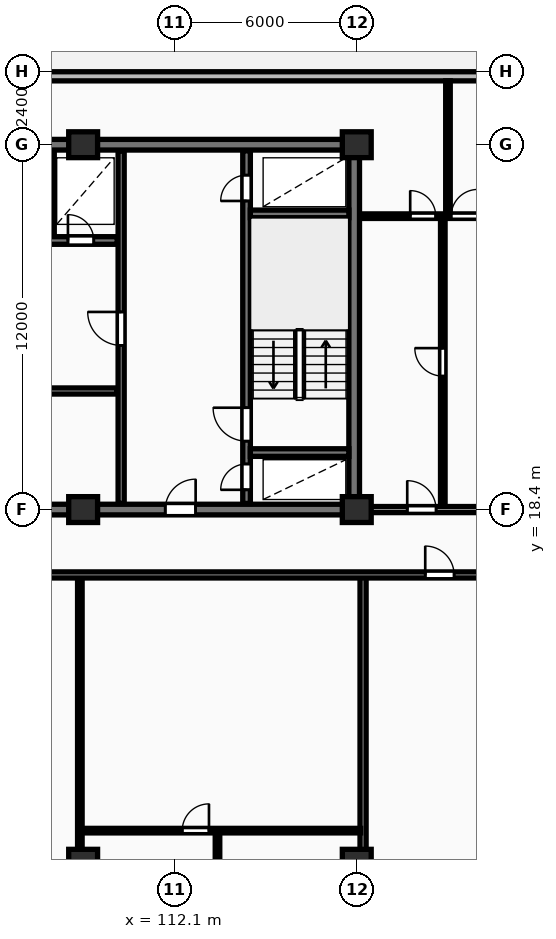
"""IFC4 building model, lengths in metres.
Left out: names, types, materials, properties, quantities, classifications, styles, units other than length and angle.
Written with IfcOpenShell. Run it as: python <this file> out.ifc"""

import sys

from ifc_helpers import new_model, si_unit, direction, frame, frame_2d, origin, origin_2d, place, context, subcontext, project, spatial, rectangle, extrude, element, fill, save


model = new_model("IFC4")
c1 = context("Model", 3, precision=1e-05, world=origin(), true_north=direction((0.0, 1.0)))
c2 = subcontext(c1, "Body", "Model", "MODEL_VIEW")
j1 = project(units=[si_unit("LENGTHUNIT", "METRE"), si_unit("PLANEANGLEUNIT", "RADIAN")], contexts=[c1])
p1 = place(None, origin())
s1 = spatial("IfcSite", under=j1, at=p1, CompositionType="ELEMENT")
p2 = place(p1, origin())
s2 = spatial("IfcBuilding", under=s1, at=p2, CompositionType="ELEMENT")
p3 = place(p2, frame((0.0, 0.0, 24.0)))
s3 = spatial("IfcBuildingStorey", under=s2, at=p3, CompositionType="ELEMENT", Elevation=24.0)
for number, where, z_axis, x_axis in (
    (1, (109.1, 6.8, 0.0), (0.0, 0.0, 1.0), (1.0, 0.0, 0.0)),
    (2, (109.1, 18.4, 0.0), (0.0, 0.0, 1.0), (1.0, 0.0, 0.0)),
    (3, (109.1, 30.4, 0.0), (0.0, 0.0, 1.0), (1.0, 0.0, 0.0)),
    (4, (118.1, 6.8, 0.0), (0.0, 0.0, 1.0), (1.0, 0.0, 0.0)),
    (5, (118.1, 18.4, 0.0), (0.0, 0.0, 1.0), (1.0, 0.0, 0.0)),
    (6, (118.1, 30.4, 0.0), (0.0, 0.0, 1.0), (1.0, 0.0, 0.0)),
):
    element("IfcColumn", number, at=place(p3, frame(where, z_axis=z_axis, x_axis=x_axis)), inside=s3, PredefinedType="COLUMN", context=c2, shape_type="SweptSolid", body=[
        extrude(rectangle(XDim=0.95, YDim=0.85, at=origin_2d()), origin(), (0.0, 0.0, 1.0), 3.25),
    ])
p4 = place(p3, frame((132.7, 32.65, 0.0), z_axis=(0.0, 0.0, 1.0), x_axis=(-1.0, 0.0, 0.0)))
e7 = element("IfcWall", 7, at=p4, inside=s3, PredefinedType="STANDARD", context=c2, shape_type="SweptSolid", body=[
    extrude(rectangle(XDim=62.0, YDim=0.3, at=frame_2d((31.0, 0.0))), origin(), (0.0, 0.0, 1.0), 2.97),
])
p5 = place(p4, frame((52.125, 0.0, 0.85)))
e8 = element("IfcOpeningElement", 8, at=p5, cuts=e7, PredefinedType="OPENING", context=c2, shape_type="SweptSolid", body=[
    extrude(rectangle(XDim=1.8, YDim=1.8, at=frame_2d((0.9, 0.9))), frame((0.0, 0.16, 0.0), z_axis=(0.0, -1.0, 0.0), x_axis=(1.0, 0.0, 0.0)), (0.0, 0.0, 1.0), 0.32),
])
p6 = place(p4, frame((8.775, 0.0, 0.85)))
e9 = element("IfcOpeningElement", 9, at=p6, cuts=e7, PredefinedType="OPENING", context=c2, shape_type="SweptSolid", body=[
    extrude(rectangle(XDim=1.8, YDim=1.8, at=frame_2d((0.9, 0.9))), frame((0.0, 0.16, 0.0), z_axis=(0.0, -1.0, 0.0), x_axis=(1.0, 0.0, 0.0)), (0.0, 0.0, 1.0), 0.32),
])
p7 = place(p3, frame((81.925, 30.4, 0.0), z_axis=(0.0, 0.0, 1.0), x_axis=(1.0, 0.0, 0.0)))
e10 = element("IfcWall", 10, at=p7, inside=s3, PredefinedType="SHEAR", context=c2, shape_type="SweptSolid", body=[
    extrude(rectangle(XDim=36.265, YDim=0.35, at=frame_2d((18.132, 0.0))), origin(), (0.0, 0.0, 1.0), 3.25),
])
p8 = place(p3, frame((118.015, 18.575, 0.0), z_axis=(0.0, 0.0, 1.0), x_axis=(0.0, 1.0, 0.0)))
e11 = element("IfcWall", 11, at=p8, inside=s3, PredefinedType="SHEAR", context=c2, shape_type="SweptSolid", body=[
    extrude(rectangle(XDim=11.65, YDim=0.35, at=frame_2d((5.825, 0.0))), origin(), (0.0, 0.0, 1.0), 3.25),
])
p9 = place(p3, frame((81.925, 18.4, 0.0), z_axis=(0.0, 0.0, 1.0), x_axis=(1.0, 0.0, 0.0)))
e12 = element("IfcWall", 12, at=p9, inside=s3, PredefinedType="SHEAR", context=c2, shape_type="SweptSolid", body=[
    extrude(rectangle(XDim=36.265, YDim=0.35, at=frame_2d((18.132, 0.0))), origin(), (0.0, 0.0, 1.0), 3.25),
])
p10 = place(p9, frame((5.675, 0.0, 0.0)))
e13 = element("IfcOpeningElement", 13, at=p10, cuts=e12, PredefinedType="OPENING", context=c2, shape_type="SweptSolid", body=[
    extrude(rectangle(XDim=1.0, YDim=2.15, at=frame_2d((0.5, 1.075))), frame((0.0, 0.185, 0.0), z_axis=(0.0, -1.0, 0.0), x_axis=(1.0, 0.0, 0.0)), (0.0, 0.0, 1.0), 0.37),
])
p11 = place(p9, frame((21.925, 0.0, 0.0)))
e14 = element("IfcOpeningElement", 14, at=p11, cuts=e12, PredefinedType="OPENING", context=c2, shape_type="SweptSolid", body=[
    extrude(rectangle(XDim=1.5, YDim=2.2, at=frame_2d((0.75, 1.1))), frame((0.0, 0.185, 0.0), z_axis=(0.0, -1.0, 0.0), x_axis=(1.0, 0.0, 0.0)), (0.0, 0.0, 1.0), 0.37),
])
p12 = place(p9, frame((29.875, 0.0, 0.0)))
e15 = element("IfcOpeningElement", 15, at=p12, cuts=e12, PredefinedType="OPENING", context=c2, shape_type="SweptSolid", body=[
    extrude(rectangle(XDim=1.0, YDim=2.15, at=frame_2d((0.5, 1.075))), frame((0.0, 0.185, 0.0), z_axis=(0.0, -1.0, 0.0), x_axis=(1.0, 0.0, 0.0)), (0.0, 0.0, 1.0), 0.37),
])
p13 = place(p3, frame((108.05, 27.38, 0.0), z_axis=(0.0, 0.0, 1.0), x_axis=(0.0, 1.0, 0.0)))
e16 = element("IfcWall", 16, at=p13, inside=s3, PredefinedType="PARTITIONING", context=c2, shape_type="SweptSolid", body=[
    extrude(rectangle(XDim=2.82, YDim=0.2, at=frame_2d((1.41, 0.0))), origin(), (0.0, 0.0, 1.0), 2.97),
])
p14 = place(p3, frame((99.68, 27.25, 0.0), z_axis=(0.0, 0.0, 1.0), x_axis=(1.0, 0.0, 0.0)))
e17 = element("IfcWall", 17, at=p14, inside=s3, PredefinedType="SHEAR", context=c2, shape_type="SweptSolid", body=[
    extrude(rectangle(XDim=10.54, YDim=0.25, at=frame_2d((5.27, 0.0))), origin(), (0.0, 0.0, 1.0), 3.25),
])
p15 = place(p14, frame((8.92, 0.0, 0.0)))
e18 = element("IfcOpeningElement", 18, at=p15, cuts=e17, PredefinedType="OPENING", context=c2, shape_type="SweptSolid", body=[
    extrude(rectangle(XDim=0.85, YDim=2.05, at=frame_2d((0.425, 1.025))), frame((0.0, 0.135, 0.0), z_axis=(0.0, -1.0, 0.0), x_axis=(1.0, 0.0, 0.0)), (0.0, 0.0, 1.0), 0.27),
])
p16 = place(p3, frame((91.08, 22.3, 0.0), z_axis=(0.0, 0.0, 1.0), x_axis=(1.0, 0.0, 0.0)))
e19 = element("IfcWall", 19, at=p16, inside=s3, PredefinedType="PARTITIONING", context=c2, shape_type="SweptSolid", body=[
    extrude(rectangle(XDim=19.14, YDim=0.2, at=frame_2d((9.57, 0.0))), origin(), (0.0, 0.0, 1.0), 2.97),
])
p17 = place(p16, frame((1.15, 0.0, 0.0)))
e20 = element("IfcOpeningElement", 20, at=p17, cuts=e19, PredefinedType="OPENING", context=c2, shape_type="SweptSolid", body=[
    extrude(rectangle(XDim=0.85, YDim=2.05, at=frame_2d((0.425, 1.025))), frame((0.0, 0.11, 0.0), z_axis=(0.0, -1.0, 0.0), x_axis=(1.0, 0.0, 0.0)), (0.0, 0.0, 1.0), 0.22),
])
p18 = place(p16, frame((3.2, 0.0, 0.0)))
e21 = element("IfcOpeningElement", 21, at=p18, cuts=e19, PredefinedType="OPENING", context=c2, shape_type="SweptSolid", body=[
    extrude(rectangle(XDim=0.85, YDim=2.05, at=frame_2d((0.425, 1.025))), frame((0.0, 0.11, 0.0), z_axis=(0.0, -1.0, 0.0), x_axis=(1.0, 0.0, 0.0)), (0.0, 0.0, 1.0), 0.22),
])
p19 = place(p16, frame((12.72, 0.0, 0.0)))
e22 = element("IfcOpeningElement", 22, at=p19, cuts=e19, PredefinedType="OPENING", context=c2, shape_type="SweptSolid", body=[
    extrude(rectangle(XDim=1.5, YDim=2.2, at=frame_2d((0.75, 1.1))), frame((0.0, 0.11, 0.0), z_axis=(0.0, -1.0, 0.0), x_axis=(1.0, 0.0, 0.0)), (0.0, 0.0, 1.0), 0.22),
])
p20 = place(p16, frame((6.42, 0.0, 0.0)))
e23 = element("IfcOpeningElement", 23, at=p20, cuts=e19, PredefinedType="OPENING", context=c2, shape_type="SweptSolid", body=[
    extrude(rectangle(XDim=0.92, YDim=2.08, at=frame_2d((0.46, 1.04))), frame((0.0, 0.11, 0.0), z_axis=(0.0, -1.0, 0.0), x_axis=(1.0, 0.0, 0.0)), (0.0, 0.0, 1.0), 0.22),
])
p21 = place(p16, frame((15.87, 0.0, 0.0)))
e24 = element("IfcOpeningElement", 24, at=p21, cuts=e19, PredefinedType="OPENING", context=c2, shape_type="SweptSolid", body=[
    extrude(rectangle(XDim=0.92, YDim=2.08, at=frame_2d((0.46, 1.04))), frame((0.0, 0.11, 0.0), z_axis=(0.0, -1.0, 0.0), x_axis=(1.0, 0.0, 0.0)), (0.0, 0.0, 1.0), 0.22),
])
p22 = place(p3, frame((110.35, 18.6, 0.0), z_axis=(0.0, 0.0, 1.0), x_axis=(0.0, 1.0, 0.0)))
e25 = element("IfcWall", 25, at=p22, inside=s3, PredefinedType="PARTITIONING", context=c2, shape_type="SweptSolid", body=[
    extrude(rectangle(XDim=11.6, YDim=0.2, at=frame_2d((5.8, 0.0))), origin(), (0.0, 0.0, 1.0), 2.97),
])
p23 = place(p22, frame((5.2, 0.0, 0.0)))
e26 = element("IfcOpeningElement", 26, at=p23, cuts=e25, PredefinedType="OPENING", context=c2, shape_type="SweptSolid", body=[
    extrude(rectangle(XDim=1.1, YDim=2.15, at=frame_2d((0.55, 1.075))), frame((0.0, 0.11, 0.0), z_axis=(0.0, -1.0, 0.0), x_axis=(1.0, 0.0, 0.0)), (0.0, 0.0, 1.0), 0.22),
])
p24 = place(p3, frame((114.475, 18.6, 0.0), z_axis=(0.0, 0.0, 1.0), x_axis=(0.0, 1.0, 0.0)))
e27 = element("IfcWall", 27, at=p24, inside=s3, PredefinedType="SHEAR", context=c2, shape_type="SweptSolid", body=[
    extrude(rectangle(XDim=11.6, YDim=0.25, at=frame_2d((5.8, 0.0))), origin(), (0.0, 0.0, 1.0), 3.25),
])
p25 = place(p24, frame((0.45, 0.0, 0.0)))
e28 = element("IfcOpeningElement", 28, at=p25, cuts=e27, PredefinedType="OPENING", context=c2, shape_type="SweptSolid", body=[
    extrude(rectangle(XDim=0.85, YDim=2.05, at=frame_2d((0.425, 1.025))), frame((0.0, 0.135, 0.0), z_axis=(0.0, -1.0, 0.0), x_axis=(1.0, 0.0, 0.0)), (0.0, 0.0, 1.0), 0.27),
])
p26 = place(p24, frame((2.05, 0.0, 0.0)))
e29 = element("IfcOpeningElement", 29, at=p26, cuts=e27, PredefinedType="OPENING", context=c2, shape_type="SweptSolid", body=[
    extrude(rectangle(XDim=1.1, YDim=2.1, at=frame_2d((0.55, 1.05))), frame((0.0, 0.135, 0.0), z_axis=(0.0, -1.0, 0.0), x_axis=(1.0, 0.0, 0.0)), (0.0, 0.0, 1.0), 0.27),
])
p27 = place(p24, frame((9.95, 0.0, 0.0)))
e30 = element("IfcOpeningElement", 30, at=p27, cuts=e27, PredefinedType="OPENING", context=c2, shape_type="SweptSolid", body=[
    extrude(rectangle(XDim=0.85, YDim=2.05, at=frame_2d((0.425, 1.025))), frame((0.0, 0.135, 0.0), z_axis=(0.0, -1.0, 0.0), x_axis=(1.0, 0.0, 0.0)), (0.0, 0.0, 1.0), 0.27),
])
for number, where, z_axis, x_axis in (
    (31, (114.6, 20.275, 0.0), (0.0, 0.0, 1.0), (1.0, 0.0, 0.0)),
    (32, (114.6, 28.125, 0.0), (0.0, 0.0, 1.0), (1.0, 0.0, 0.0)),
):
    element("IfcWall", number, at=place(p3, frame(where, z_axis=z_axis, x_axis=x_axis)), inside=s3, PredefinedType="SHEAR", context=c2, shape_type="SweptSolid", body=[
        extrude(rectangle(XDim=3.24, YDim=0.25, at=frame_2d((1.62, 0.0))), origin(), (0.0, 0.0, 1.0), 3.25),
    ])
p28 = place(p3, frame((120.93, 18.45, 0.0), z_axis=(0.0, 0.0, 1.0), x_axis=(0.0, 1.0, 0.0)))
e33 = element("IfcWall", 33, at=p28, inside=s3, PredefinedType="PARTITIONING", context=c2, shape_type="SweptSolid", body=[
    extrude(rectangle(XDim=9.6, YDim=0.15, at=frame_2d((4.8, 0.0))), origin(), (0.0, 0.0, 1.0), 2.97),
])
p29 = place(p28, frame((4.34, 0.0, 0.0)))
e34 = element("IfcOpeningElement", 34, at=p29, cuts=e33, PredefinedType="OPENING", context=c2, shape_type="SweptSolid", body=[
    extrude(rectangle(XDim=0.92, YDim=2.08, at=frame_2d((0.46, 1.04))), frame((0.0, 0.085, 0.0), z_axis=(0.0, -1.0, 0.0), x_axis=(1.0, 0.0, 0.0)), (0.0, 0.0, 1.0), 0.17),
])
p30 = place(p3, frame((121.1, 28.05, 0.0), z_axis=(0.0, 0.0, 1.0), x_axis=(0.0, 1.0, 0.0)))
e35 = element("IfcWall", 35, at=p30, inside=s3, PredefinedType="PARTITIONING", context=c2, shape_type="SweptSolid", body=[
    extrude(rectangle(XDim=4.45, YDim=0.15, at=frame_2d((2.225, 0.0))), origin(), (0.0, 0.0, 1.0), 2.97),
])
p31 = place(p3, frame((118.27, 28.05, 0.0), z_axis=(0.0, 0.0, 1.0), x_axis=(1.0, 0.0, 0.0)))
e36 = element("IfcWall", 36, at=p31, inside=s3, PredefinedType="PARTITIONING", context=c2, shape_type="SweptSolid", body=[
    extrude(rectangle(XDim=6.76, YDim=0.15, at=frame_2d((3.38, 0.0))), origin(), (0.0, 0.0, 1.0), 2.97),
])
p32 = place(p31, frame((1.587, 0.0, 0.0)))
e37 = element("IfcOpeningElement", 37, at=p32, cuts=e36, PredefinedType="OPENING", context=c2, shape_type="SweptSolid", body=[
    extrude(rectangle(XDim=0.84, YDim=2.04, at=frame_2d((0.42, 1.02))), frame((0.0, 0.085, 0.0), z_axis=(0.0, -1.0, 0.0), x_axis=(1.0, 0.0, 0.0)), (0.0, 0.0, 1.0), 0.17),
])
p33 = place(p31, frame((2.934, 0.0, 0.0)))
e38 = element("IfcOpeningElement", 38, at=p33, cuts=e36, PredefinedType="OPENING", context=c2, shape_type="SweptSolid", body=[
    extrude(rectangle(XDim=0.88, YDim=2.06, at=frame_2d((0.44, 1.03))), frame((0.0, 0.085, 0.0), z_axis=(0.0, -1.0, 0.0), x_axis=(1.0, 0.0, 0.0)), (0.0, 0.0, 1.0), 0.17),
])
p34 = place(p3, frame((118.25, 18.4, 0.0), z_axis=(0.0, 0.0, 1.0), x_axis=(1.0, 0.0, 0.0)))
e39 = element("IfcWall", 39, at=p34, inside=s3, PredefinedType="PARTITIONING", context=c2, shape_type="SweptSolid", body=[
    extrude(rectangle(XDim=14.45, YDim=0.2, at=frame_2d((7.225, 0.0))), origin(), (0.0, 0.0, 1.0), 2.37),
])
p35 = place(p34, frame((1.51, 0.0, 0.0)))
e40 = element("IfcOpeningElement", 40, at=p35, cuts=e39, PredefinedType="OPENING", context=c2, shape_type="SweptSolid", body=[
    extrude(rectangle(XDim=0.95, YDim=2.15, at=frame_2d((0.475, 1.075))), frame((0.0, 0.11, 0.0), z_axis=(0.0, -1.0, 0.0), x_axis=(1.0, 0.0, 0.0)), (0.0, 0.0, 1.0), 0.22),
])
p36 = place(p3, frame((118.307, -10.9, 0.0), z_axis=(0.0, 0.0, 1.0), x_axis=(0.0, 1.0, 0.0)))
e41 = element("IfcWall", 41, at=p36, inside=s3, PredefinedType="PARTITIONING", context=c2, shape_type="SweptSolid", body=[
    extrude(rectangle(XDim=27.07, YDim=0.2, at=frame_2d((13.535, 0.0))), origin(), (0.0, 0.0, 1.0), 2.22),
])
p37 = place(p3, frame((113.519, -0.51, 0.0), z_axis=(0.0, 0.0, 1.0), x_axis=(0.0, 1.0, 0.0)))
e42 = element("IfcWall", 42, at=p37, inside=s3, PredefinedType="PARTITIONING", context=c2, shape_type="SweptSolid", body=[
    extrude(rectangle(XDim=8.35, YDim=0.15, at=frame_2d((4.175, 0.0))), origin(), (0.0, 0.0, 1.0), 2.97),
])
p38 = place(p37, frame((3.755, 0.0, 0.0)))
e43 = element("IfcOpeningElement", 43, at=p38, cuts=e42, PredefinedType="OPENING", context=c2, shape_type="SweptSolid", body=[
    extrude(rectangle(XDim=0.84, YDim=2.04, at=frame_2d((0.42, 1.02))), frame((0.0, 0.085, 0.0), z_axis=(0.0, -1.0, 0.0), x_axis=(1.0, 0.0, 0.0)), (0.0, 0.0, 1.0), 0.17),
])
p39 = place(p3, frame((109.052, 7.84, 0.0), z_axis=(0.0, 0.0, 1.0), x_axis=(1.0, 0.0, 0.0)))
e44 = element("IfcWall", 44, at=p39, inside=s3, PredefinedType="PARTITIONING", context=c2, shape_type="SweptSolid", body=[
    extrude(rectangle(XDim=9.176, YDim=0.15, at=frame_2d((4.588, 0.0))), origin(), (0.0, 0.0, 1.0), 2.97),
])
p40 = place(p39, frame((3.307, 0.0, 0.0)))
e45 = element("IfcOpeningElement", 45, at=p40, cuts=e44, PredefinedType="OPENING", context=c2, shape_type="SweptSolid", body=[
    extrude(rectangle(XDim=0.88, YDim=2.06, at=frame_2d((0.44, 1.03))), frame((0.0, 0.085, 0.0), z_axis=(0.0, -1.0, 0.0), x_axis=(1.0, 0.0, 0.0)), (0.0, 0.0, 1.0), 0.17),
])
p41 = place(p3, frame((108.991, -0.51, 0.0), z_axis=(0.0, 0.0, 1.0), x_axis=(0.0, 1.0, 0.0)))
e46 = element("IfcWall", 46, at=p41, inside=s3, PredefinedType="PARTITIONING", context=c2, shape_type="SweptSolid", body=[
    extrude(rectangle(XDim=16.7, YDim=0.15, at=frame_2d((8.35, 0.0))), origin(), (0.0, 0.0, 1.0), 2.22),
])
p42 = place(p41, frame((4.747, 0.0, 0.0)))
e47 = element("IfcOpeningElement", 47, at=p42, cuts=e46, PredefinedType="OPENING", context=c2, shape_type="SweptSolid", body=[
    extrude(rectangle(XDim=0.88, YDim=2.06, at=frame_2d((0.44, 1.03))), frame((0.0, 0.085, 0.0), z_axis=(0.0, -1.0, 0.0), x_axis=(1.0, 0.0, 0.0)), (0.0, 0.0, 1.0), 0.17),
])
p43 = place(p3, frame((70.7, 16.25, 0.0), z_axis=(0.0, 0.0, 1.0), x_axis=(1.0, 0.0, 0.0)))
e48 = element("IfcWall", 48, at=p43, inside=s3, PredefinedType="PARTITIONING", context=c2, shape_type="SweptSolid", body=[
    extrude(rectangle(XDim=62.0, YDim=0.2, at=frame_2d((31.0, 0.0))), origin(), (0.0, 0.0, 1.0), 2.97),
])
p44 = place(p43, frame((1.186, 0.0, 0.0)))
e49 = element("IfcOpeningElement", 49, at=p44, cuts=e48, PredefinedType="OPENING", context=c2, shape_type="SweptSolid", body=[
    extrude(rectangle(XDim=0.95, YDim=2.15, at=frame_2d((0.475, 1.075))), frame((0.0, 0.11, 0.0), z_axis=(0.0, -1.0, 0.0), x_axis=(1.0, 0.0, 0.0)), (0.0, 0.0, 1.0), 0.22),
])
p45 = place(p43, frame((13.116, 0.0, 0.0)))
e50 = element("IfcOpeningElement", 50, at=p45, cuts=e48, PredefinedType="OPENING", context=c2, shape_type="SweptSolid", body=[
    extrude(rectangle(XDim=0.95, YDim=2.15, at=frame_2d((0.475, 1.075))), frame((0.0, 0.11, 0.0), z_axis=(0.0, -1.0, 0.0), x_axis=(1.0, 0.0, 0.0)), (0.0, 0.0, 1.0), 0.22),
])
p46 = place(p43, frame((25.295, 0.0, 0.0)))
e51 = element("IfcOpeningElement", 51, at=p46, cuts=e48, PredefinedType="OPENING", context=c2, shape_type="SweptSolid", body=[
    extrude(rectangle(XDim=0.95, YDim=2.15, at=frame_2d((0.475, 1.075))), frame((0.0, 0.11, 0.0), z_axis=(0.0, -1.0, 0.0), x_axis=(1.0, 0.0, 0.0)), (0.0, 0.0, 1.0), 0.22),
])
p47 = place(p43, frame((35.747, 0.0, 0.0)))
e52 = element("IfcOpeningElement", 52, at=p47, cuts=e48, PredefinedType="OPENING", context=c2, shape_type="SweptSolid", body=[
    extrude(rectangle(XDim=0.95, YDim=2.15, at=frame_2d((0.475, 1.075))), frame((0.0, 0.11, 0.0), z_axis=(0.0, -1.0, 0.0), x_axis=(1.0, 0.0, 0.0)), (0.0, 0.0, 1.0), 0.22),
])
p48 = place(p43, frame((49.652, 0.0, 0.0)))
e53 = element("IfcOpeningElement", 53, at=p48, cuts=e48, PredefinedType="OPENING", context=c2, shape_type="SweptSolid", body=[
    extrude(rectangle(XDim=0.95, YDim=2.15, at=frame_2d((0.475, 1.075))), frame((0.0, 0.11, 0.0), z_axis=(0.0, -1.0, 0.0), x_axis=(1.0, 0.0, 0.0)), (0.0, 0.0, 1.0), 0.22),
])
p49 = place(p12, origin())
e54 = element("IfcDoor", 54, at=p49, inside=s3, OperationType="SINGLE_SWING_RIGHT", PredefinedType="DOOR", context=c2, shape_type="SweptSolid", body=[
    extrude(rectangle(XDim=1.0, YDim=2.15, at=frame_2d((0.5, 1.075))), frame((0.0, 0.025, 0.0), z_axis=(0.0, -1.0, 0.0), x_axis=(1.0, 0.0, 0.0)), (0.0, 0.0, 1.0), 0.05),
])
fill(e15, e54)
p50 = place(p15, origin())
e55 = element("IfcDoor", 55, at=p50, inside=s3, OperationType="SINGLE_SWING_LEFT", PredefinedType="DOOR", context=c2, shape_type="SweptSolid", body=[
    extrude(rectangle(XDim=0.85, YDim=2.05, at=frame_2d((0.425, 1.025))), frame((0.0, 0.025, 0.0), z_axis=(0.0, -1.0, 0.0), x_axis=(1.0, 0.0, 0.0)), (0.0, 0.0, 1.0), 0.05),
])
fill(e18, e55)
p51 = place(p23, origin())
e56 = element("IfcDoor", 56, at=p51, inside=s3, OperationType="SINGLE_SWING_RIGHT", PredefinedType="DOOR", context=c2, shape_type="SweptSolid", body=[
    extrude(rectangle(XDim=1.1, YDim=2.15, at=frame_2d((0.55, 1.075))), frame((0.0, 0.025, 0.0), z_axis=(0.0, -1.0, 0.0), x_axis=(1.0, 0.0, 0.0)), (0.0, 0.0, 1.0), 0.05),
])
fill(e26, e56)
p52 = place(p25, origin())
e57 = element("IfcDoor", 57, at=p52, inside=s3, OperationType="SINGLE_SWING_LEFT", PredefinedType="DOOR", context=c2, shape_type="SweptSolid", body=[
    extrude(rectangle(XDim=0.85, YDim=2.05, at=frame_2d((0.425, 1.025))), frame((0.0, 0.025, 0.0), z_axis=(0.0, -1.0, 0.0), x_axis=(1.0, 0.0, 0.0)), (0.0, 0.0, 1.0), 0.05),
])
fill(e28, e57)
p53 = place(p26, origin())
e58 = element("IfcDoor", 58, at=p53, inside=s3, OperationType="SINGLE_SWING_RIGHT", PredefinedType="DOOR", context=c2, shape_type="SweptSolid", body=[
    extrude(rectangle(XDim=1.1, YDim=2.1, at=frame_2d((0.55, 1.05))), frame((0.0, 0.025, 0.0), z_axis=(0.0, -1.0, 0.0), x_axis=(1.0, 0.0, 0.0)), (0.0, 0.0, 1.0), 0.05),
])
fill(e29, e58)
p54 = place(p27, origin())
e59 = element("IfcDoor", 59, at=p54, inside=s3, OperationType="SINGLE_SWING_LEFT", PredefinedType="DOOR", context=c2, shape_type="SweptSolid", body=[
    extrude(rectangle(XDim=0.85, YDim=2.05, at=frame_2d((0.425, 1.025))), frame((0.0, 0.025, 0.0), z_axis=(0.0, -1.0, 0.0), x_axis=(1.0, 0.0, 0.0)), (0.0, 0.0, 1.0), 0.05),
])
fill(e30, e59)
p55 = place(p29, origin())
e60 = element("IfcDoor", 60, at=p55, inside=s3, OperationType="SINGLE_SWING_RIGHT", PredefinedType="DOOR", context=c2, shape_type="SweptSolid", body=[
    extrude(rectangle(XDim=0.92, YDim=2.08, at=frame_2d((0.46, 1.04))), frame((0.0, 0.025, 0.0), z_axis=(0.0, -1.0, 0.0), x_axis=(1.0, 0.0, 0.0)), (0.0, 0.0, 1.0), 0.05),
])
fill(e34, e60)
p56 = place(p32, origin())
e61 = element("IfcDoor", 61, at=p56, inside=s3, OperationType="SINGLE_SWING_LEFT", PredefinedType="DOOR", context=c2, shape_type="SweptSolid", body=[
    extrude(rectangle(XDim=0.84, YDim=2.04, at=frame_2d((0.42, 1.02))), frame((0.0, 0.025, 0.0), z_axis=(0.0, -1.0, 0.0), x_axis=(1.0, 0.0, 0.0)), (0.0, 0.0, 1.0), 0.05),
])
fill(e37, e61)
p57 = place(p33, origin())
e62 = element("IfcDoor", 62, at=p57, inside=s3, OperationType="SINGLE_SWING_RIGHT", PredefinedType="DOOR", context=c2, shape_type="SweptSolid", body=[
    extrude(rectangle(XDim=0.88, YDim=2.06, at=frame_2d((0.44, 1.03))), frame((0.0, 0.025, 0.0), z_axis=(0.0, -1.0, 0.0), x_axis=(1.0, 0.0, 0.0)), (0.0, 0.0, 1.0), 0.05),
])
fill(e38, e62)
p58 = place(p35, origin())
e63 = element("IfcDoor", 63, at=p58, inside=s3, OperationType="SINGLE_SWING_LEFT", PredefinedType="DOOR", context=c2, shape_type="SweptSolid", body=[
    extrude(rectangle(XDim=0.95, YDim=2.15, at=frame_2d((0.475, 1.075))), frame((0.0, 0.025, 0.0), z_axis=(0.0, -1.0, 0.0), x_axis=(1.0, 0.0, 0.0)), (0.0, 0.0, 1.0), 0.05),
])
fill(e40, e63)
p59 = place(p40, origin())
e64 = element("IfcDoor", 64, at=p59, inside=s3, OperationType="SINGLE_SWING_RIGHT", PredefinedType="DOOR", context=c2, shape_type="SweptSolid", body=[
    extrude(rectangle(XDim=0.88, YDim=2.06, at=frame_2d((0.44, 1.03))), frame((0.0, 0.025, 0.0), z_axis=(0.0, -1.0, 0.0), x_axis=(1.0, 0.0, 0.0)), (0.0, 0.0, 1.0), 0.05),
])
fill(e45, e64)
p60 = place(p48, origin())
e65 = element("IfcDoor", 65, at=p60, inside=s3, OperationType="SINGLE_SWING_LEFT", PredefinedType="DOOR", context=c2, shape_type="SweptSolid", body=[
    extrude(rectangle(XDim=0.95, YDim=2.15, at=frame_2d((0.475, 1.075))), frame((0.0, 0.025, 0.0), z_axis=(0.0, -1.0, 0.0), x_axis=(1.0, 0.0, 0.0)), (0.0, 0.0, 1.0), 0.05),
])
fill(e53, e65)
save(model, sys.argv[1])
